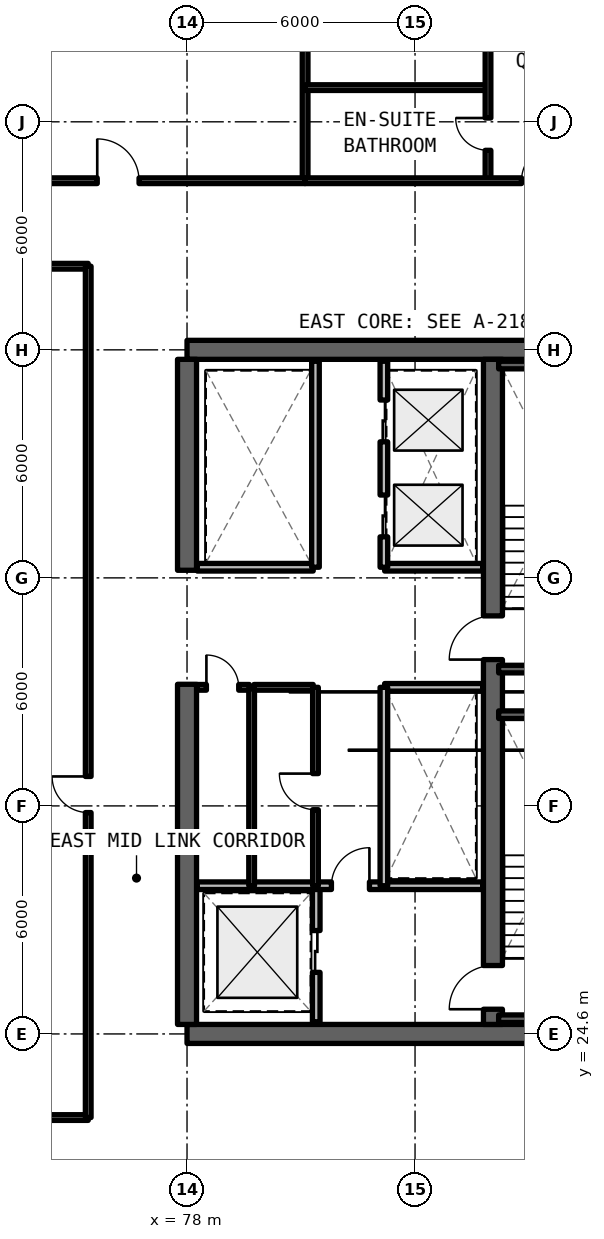
"""IFC4 building model, lengths in metres.
Left out: names, types, materials, properties, quantities, classifications, styles, units other than length and angle.
Written with IfcOpenShell. Run it as: python <this file> out.ifc"""

import sys

from ifc_helpers import new_model, si_unit, direction, frame, frame_2d, origin, place, context, subcontext, project, spatial, rectangle, extrude, element, fill, save


model = new_model("IFC4")
c1 = context("Model", 3, precision=1e-05, world=origin(), true_north=direction((0.0, 1.0)))
c2 = subcontext(c1, "Body", "Model", "MODEL_VIEW")
j1 = project(units=[si_unit("LENGTHUNIT", "METRE"), si_unit("PLANEANGLEUNIT", "RADIAN")], contexts=[c1])
p1 = place(None, origin())
s1 = spatial("IfcSite", under=j1, at=p1, CompositionType="ELEMENT")
p2 = place(p1, origin())
s2 = spatial("IfcBuilding", under=s1, at=p2, CompositionType="ELEMENT")
p3 = place(p2, frame((0.0, 0.0, 82.17)))
s3 = spatial("IfcBuildingStorey", under=s2, at=p3, CompositionType="ELEMENT", Elevation=82.17)
for number, where, z_axis, x_axis in (
    (1, (78.0, 24.6, 0.0), (0.0, 0.0, 1.0), (1.0, 0.0, 0.0)),
    (2, (90.0, 42.6, 0.0), (0.0, 0.0, 1.0), (-1.0, 0.0, 0.0)),
):
    element("IfcWall", number, at=place(p3, frame(where, z_axis=z_axis, x_axis=x_axis)), inside=s3, PredefinedType="SHEAR", context=c2, shape_type="SweptSolid", body=[
        extrude(rectangle(XDim=12.0, YDim=0.5, at=frame_2d((6.0, 0.0))), origin(), (0.0, 0.0, 1.0), 3.3),
    ])
p4 = place(p3, frame((78.0, 24.85, 0.0), z_axis=(0.0, 0.0, 1.0), x_axis=(0.0, 1.0, 0.0)))
e3 = element("IfcWall", 3, at=p4, inside=s3, PredefinedType="SHEAR", context=c2, shape_type="SweptSolid", body=[
    extrude(rectangle(XDim=8.95, YDim=0.5, at=frame_2d((4.475, 0.0))), origin(), (0.0, 0.0, 1.0), 3.3),
])
p5 = place(p3, frame((78.0, 36.8, 0.0), z_axis=(0.0, 0.0, 1.0), x_axis=(0.0, 1.0, 0.0)))
e4 = element("IfcWall", 4, at=p5, inside=s3, PredefinedType="SHEAR", context=c2, shape_type="SweptSolid", body=[
    extrude(rectangle(XDim=5.55, YDim=0.5, at=frame_2d((2.775, 0.0))), origin(), (0.0, 0.0, 1.0), 3.3),
])
p6 = place(p3, frame((86.05, 24.85, 0.0), z_axis=(0.0, 0.0, 1.0), x_axis=(0.0, 1.0, 0.0)))
e5 = element("IfcWall", 5, at=p6, inside=s3, PredefinedType="SHEAR", context=c2, shape_type="SweptSolid", body=[
    extrude(rectangle(XDim=17.5, YDim=0.5, at=frame_2d((8.75, 0.0))), origin(), (0.0, 0.0, 1.0), 3.3),
])
p7 = place(p6, frame((0.4, 0.0, 0.0)))
e6 = element("IfcOpeningElement", 6, at=p7, cuts=e5, PredefinedType="OPENING", context=c2, shape_type="SweptSolid", body=[
    extrude(rectangle(XDim=1.15, YDim=2.15, at=frame_2d((0.575, 1.075))), frame((0.0, 0.26, 0.0), z_axis=(0.0, -1.0, 0.0), x_axis=(1.0, 0.0, 0.0)), (0.0, 0.0, 1.0), 0.52),
])
p8 = place(p6, frame((9.6, 0.0, 0.0)))
e7 = element("IfcOpeningElement", 7, at=p8, cuts=e5, PredefinedType="OPENING", context=c2, shape_type="SweptSolid", body=[
    extrude(rectangle(XDim=1.15, YDim=2.15, at=frame_2d((0.575, 1.075))), frame((0.0, 0.26, 0.0), z_axis=(0.0, -1.0, 0.0), x_axis=(1.0, 0.0, 0.0)), (0.0, 0.0, 1.0), 0.52),
])
p9 = place(p3, frame((81.4, 24.92, 0.0), z_axis=(0.0, 0.0, 1.0), x_axis=(0.0, 1.0, 0.0)))
e8 = element("IfcWall", 8, at=p9, inside=s3, PredefinedType="SOLIDWALL", context=c2, shape_type="SweptSolid", body=[
    extrude(rectangle(XDim=3.58, YDim=0.2, at=frame_2d((1.79, 0.0))), origin(), (0.0, 0.0, 1.0), 2.35),
])
p10 = place(p9, frame((1.3, 0.0, 0.0)))
e9 = element("IfcOpeningElement", 9, at=p10, cuts=e8, PredefinedType="OPENING", context=c2, shape_type="SweptSolid", body=[
    extrude(rectangle(XDim=1.1, YDim=2.2, at=frame_2d((0.55, 1.1))), frame((0.0, 0.11, 0.0), z_axis=(0.0, -1.0, 0.0), x_axis=(1.0, 0.0, 0.0)), (0.0, 0.0, 1.0), 0.22),
])
p11 = place(p3, frame((78.27, 28.5, 0.0), z_axis=(0.0, 0.0, 1.0), x_axis=(1.0, 0.0, 0.0)))
e10 = element("IfcWall", 10, at=p11, inside=s3, PredefinedType="SOLIDWALL", context=c2, shape_type="SweptSolid", body=[
    extrude(rectangle(XDim=7.51, YDim=0.2, at=frame_2d((3.755, 0.0))), origin(), (0.0, 0.0, 1.0), 2.35),
])
p12 = place(p11, frame((3.53, 0.0, 0.0)))
e11 = element("IfcOpeningElement", 11, at=p12, cuts=e10, PredefinedType="OPENING", context=c2, shape_type="SweptSolid", body=[
    extrude(rectangle(XDim=1.0, YDim=2.15, at=frame_2d((0.5, 1.075))), frame((0.0, 0.11, 0.0), z_axis=(0.0, -1.0, 0.0), x_axis=(1.0, 0.0, 0.0)), (0.0, 0.0, 1.0), 0.22),
])
p13 = place(p3, frame((83.2, 33.72, 0.0), z_axis=(0.0, 0.0, 1.0), x_axis=(1.0, 0.0, 0.0)))
e12 = element("IfcWall", 12, at=p13, inside=s3, PredefinedType="SOLIDWALL", context=c2, shape_type="SweptSolid", body=[
    extrude(rectangle(XDim=2.58, YDim=0.2, at=frame_2d((1.29, 0.0))), origin(), (0.0, 0.0, 1.0), 2.35),
])
p14 = place(p3, frame((83.18, 28.5, 0.0), z_axis=(0.0, 0.0, 1.0), x_axis=(0.0, 1.0, 0.0)))
e13 = element("IfcWall", 13, at=p14, inside=s3, PredefinedType="SOLIDWALL", context=c2, shape_type="SweptSolid", body=[
    extrude(rectangle(XDim=5.22, YDim=0.2, at=frame_2d((2.61, 0.0))), origin(), (0.0, 0.0, 1.0), 2.35),
])
p15 = place(p3, frame((79.7, 28.5, 0.0), z_axis=(0.0, 0.0, 1.0), x_axis=(0.0, 1.0, 0.0)))
e14 = element("IfcWall", 14, at=p15, inside=s3, PredefinedType="SOLIDWALL", context=c2, shape_type="SweptSolid", body=[
    extrude(rectangle(XDim=5.22, YDim=0.15, at=frame_2d((2.61, 0.0))), origin(), (0.0, 0.0, 1.0), 2.35),
])
p16 = place(p3, frame((79.76, 33.72, 0.0), z_axis=(0.0, 0.0, 1.0), x_axis=(1.0, 0.0, 0.0)))
e15 = element("IfcWall", 15, at=p16, inside=s3, PredefinedType="SOLIDWALL", context=c2, shape_type="SweptSolid", body=[
    extrude(rectangle(XDim=1.56, YDim=0.15, at=frame_2d((0.78, 0.0))), origin(), (0.0, 0.0, 1.0), 2.35),
])
p17 = place(p3, frame((78.27, 33.72, 0.0), z_axis=(0.0, 0.0, 1.0), x_axis=(1.0, 0.0, 0.0)))
e16 = element("IfcWall", 16, at=p17, inside=s3, PredefinedType="SOLIDWALL", context=c2, shape_type="SweptSolid", body=[
    extrude(rectangle(XDim=1.37, YDim=0.15, at=frame_2d((0.685, 0.0))), origin(), (0.0, 0.0, 1.0), 2.35),
])
p18 = place(p17, frame((0.24, 0.0, 0.0)))
e17 = element("IfcOpeningElement", 17, at=p18, cuts=e16, PredefinedType="OPENING", context=c2, shape_type="SweptSolid", body=[
    extrude(rectangle(XDim=0.85, YDim=2.1, at=frame_2d((0.425, 1.05))), frame((0.0, 0.085, 0.0), z_axis=(0.0, -1.0, 0.0), x_axis=(1.0, 0.0, 0.0)), (0.0, 0.0, 1.0), 0.17),
])
p19 = place(p3, frame((81.38, 28.5, 0.0), z_axis=(0.0, 0.0, 1.0), x_axis=(0.0, 1.0, 0.0)))
e18 = element("IfcWall", 18, at=p19, inside=s3, PredefinedType="SOLIDWALL", context=c2, shape_type="SweptSolid", body=[
    extrude(rectangle(XDim=5.22, YDim=0.15, at=frame_2d((2.61, 0.0))), origin(), (0.0, 0.0, 1.0), 2.35),
])
p20 = place(p19, frame((2.0, 0.0, 0.0)))
e19 = element("IfcOpeningElement", 19, at=p20, cuts=e18, PredefinedType="OPENING", context=c2, shape_type="SweptSolid", body=[
    extrude(rectangle(XDim=0.95, YDim=2.15, at=frame_2d((0.475, 1.075))), frame((0.0, 0.085, 0.0), z_axis=(0.0, -1.0, 0.0), x_axis=(1.0, 0.0, 0.0)), (0.0, 0.0, 1.0), 0.17),
])
p21 = place(p3, frame((83.2, 36.88, 0.0), z_axis=(0.0, 0.0, 1.0), x_axis=(1.0, 0.0, 0.0)))
e20 = element("IfcWall", 20, at=p21, inside=s3, PredefinedType="SOLIDWALL", context=c2, shape_type="SweptSolid", body=[
    extrude(rectangle(XDim=2.58, YDim=0.2, at=frame_2d((1.29, 0.0))), origin(), (0.0, 0.0, 1.0), 2.35),
])
p22 = place(p3, frame((83.18, 36.88, 0.0), z_axis=(0.0, 0.0, 1.0), x_axis=(0.0, 1.0, 0.0)))
e21 = element("IfcWall", 21, at=p22, inside=s3, PredefinedType="SOLIDWALL", context=c2, shape_type="SweptSolid", body=[
    extrude(rectangle(XDim=5.42, YDim=0.2, at=frame_2d((2.71, 0.0))), origin(), (0.0, 0.0, 1.0), 2.35),
])
p23 = place(p22, frame((0.8, 0.0, 0.0)))
e22 = element("IfcOpeningElement", 22, at=p23, cuts=e21, PredefinedType="OPENING", context=c2, shape_type="SweptSolid", body=[
    extrude(rectangle(XDim=1.1, YDim=2.2, at=frame_2d((0.55, 1.1))), frame((0.0, 0.11, 0.0), z_axis=(0.0, -1.0, 0.0), x_axis=(1.0, 0.0, 0.0)), (0.0, 0.0, 1.0), 0.22),
])
p24 = place(p22, frame((3.3, 0.0, 0.0)))
e23 = element("IfcOpeningElement", 23, at=p24, cuts=e21, PredefinedType="OPENING", context=c2, shape_type="SweptSolid", body=[
    extrude(rectangle(XDim=1.1, YDim=2.2, at=frame_2d((0.55, 1.1))), frame((0.0, 0.11, 0.0), z_axis=(0.0, -1.0, 0.0), x_axis=(1.0, 0.0, 0.0)), (0.0, 0.0, 1.0), 0.22),
])
p25 = place(p3, frame((78.27, 36.88, 0.0), z_axis=(0.0, 0.0, 1.0), x_axis=(1.0, 0.0, 0.0)))
e24 = element("IfcWall", 24, at=p25, inside=s3, PredefinedType="SOLIDWALL", context=c2, shape_type="SweptSolid", body=[
    extrude(rectangle(XDim=3.05, YDim=0.2, at=frame_2d((1.525, 0.0))), origin(), (0.0, 0.0, 1.0), 2.35),
])
p26 = place(p3, frame((81.38, 36.88, 0.0), z_axis=(0.0, 0.0, 1.0), x_axis=(0.0, 1.0, 0.0)))
e25 = element("IfcWall", 25, at=p26, inside=s3, PredefinedType="SOLIDWALL", context=c2, shape_type="SweptSolid", body=[
    extrude(rectangle(XDim=5.42, YDim=0.2, at=frame_2d((2.71, 0.0))), origin(), (0.0, 0.0, 1.0), 2.35),
])
for number, where, z_axis, x_axis in (
    (26, (67.15, 22.4, 0.0), (0.0, 0.0, 1.0), (1.0, 0.0, 0.0)),
    (27, (67.15, 44.8, 0.0), (0.0, 0.0, 1.0), (1.0, 0.0, 0.0)),
):
    element("IfcWall", number, at=place(p3, frame(where, z_axis=z_axis, x_axis=x_axis)), inside=s3, PredefinedType="SOLIDWALL", context=c2, shape_type="SweptSolid", body=[
        extrude(rectangle(XDim=8.25, YDim=0.15, at=frame_2d((4.125, 0.0))), origin(), (0.0, 0.0, 1.0), 2.35),
    ])
p27 = place(p3, frame((75.4, 22.4, 0.0), z_axis=(0.0, 0.0, 1.0), x_axis=(0.0, 1.0, 0.0)))
e28 = element("IfcWall", 28, at=p27, inside=s3, PredefinedType="SOLIDWALL", context=c2, shape_type="SweptSolid", body=[
    extrude(rectangle(XDim=22.4, YDim=0.15, at=frame_2d((11.2, 0.0))), origin(), (0.0, 0.0, 1.0), 2.35),
])
p28 = place(p27, frame((8.025, 0.0, 0.0)))
e29 = element("IfcOpeningElement", 29, at=p28, cuts=e28, PredefinedType="OPENING", context=c2, shape_type="SweptSolid", body=[
    extrude(rectangle(XDim=0.95, YDim=2.15, at=frame_2d((0.475, 1.075))), frame((0.0, 0.085, 0.0), z_axis=(0.0, -1.0, 0.0), x_axis=(1.0, 0.0, 0.0)), (0.0, 0.0, 1.0), 0.17),
])
p29 = place(p3, frame((81.107, 47.05, 0.0), z_axis=(0.0, 0.0, 1.0), x_axis=(0.0, 1.0, 0.0)))
e30 = element("IfcWall", 30, at=p29, inside=s3, PredefinedType="SOLIDWALL", context=c2, shape_type="SweptSolid", body=[
    extrude(rectangle(XDim=10.3, YDim=0.15, at=frame_2d((5.15, 0.0))), origin(), (0.0, 0.0, 1.0), 2.35),
])
p30 = place(p3, frame((71.268, 47.05, 0.0), z_axis=(0.0, 0.0, 1.0), x_axis=(1.0, 0.0, 0.0)))
e31 = element("IfcWall", 31, at=p30, inside=s3, PredefinedType="SOLIDWALL", context=c2, shape_type="SweptSolid", body=[
    extrude(rectangle(XDim=9.84, YDim=0.15, at=frame_2d((4.92, 0.0))), origin(), (0.0, 0.0, 1.0), 2.35),
])
p31 = place(p30, frame((4.37, 0.0, 0.0)))
e32 = element("IfcOpeningElement", 32, at=p31, cuts=e31, PredefinedType="OPENING", context=c2, shape_type="SweptSolid", body=[
    extrude(rectangle(XDim=1.1, YDim=2.15, at=frame_2d((0.55, 1.075))), frame((0.0, 0.085, 0.0), z_axis=(0.0, -1.0, 0.0), x_axis=(1.0, 0.0, 0.0)), (0.0, 0.0, 1.0), 0.17),
])
p32 = place(p3, frame((81.107, 49.5, 0.0), z_axis=(0.0, 0.0, 1.0), x_axis=(1.0, 0.0, 0.0)))
e33 = element("IfcWall", 33, at=p32, inside=s3, PredefinedType="PARTITIONING", context=c2, shape_type="SweptSolid", body=[
    extrude(rectangle(XDim=4.812, YDim=0.15, at=frame_2d((2.406, 0.0))), origin(), (0.0, 0.0, 1.0), 2.35),
])
p33 = place(p3, frame((85.92, 47.05, 0.0), z_axis=(0.0, 0.0, 1.0), x_axis=(0.0, 1.0, 0.0)))
e34 = element("IfcWall", 34, at=p33, inside=s3, PredefinedType="PARTITIONING", context=c2, shape_type="SweptSolid", body=[
    extrude(rectangle(XDim=10.3, YDim=0.15, at=frame_2d((5.15, 0.0))), origin(), (0.0, 0.0, 1.0), 2.35),
])
p34 = place(p33, frame((0.8, 0.0, 0.0)))
e35 = element("IfcOpeningElement", 35, at=p34, cuts=e34, PredefinedType="OPENING", context=c2, shape_type="SweptSolid", body=[
    extrude(rectangle(XDim=0.85, YDim=2.1, at=frame_2d((0.425, 1.05))), frame((0.0, 0.085, 0.0), z_axis=(0.0, -1.0, 0.0), x_axis=(1.0, 0.0, 0.0)), (0.0, 0.0, 1.0), 0.17),
])
p35 = place(p33, frame((5.25, 0.0, 0.0)))
e36 = element("IfcOpeningElement", 36, at=p35, cuts=e34, PredefinedType="OPENING", context=c2, shape_type="SweptSolid", body=[
    extrude(rectangle(XDim=0.85, YDim=2.1, at=frame_2d((0.425, 1.05))), frame((0.0, 0.085, 0.0), z_axis=(0.0, -1.0, 0.0), x_axis=(1.0, 0.0, 0.0)), (0.0, 0.0, 1.0), 0.17),
])
p36 = place(p3, frame((81.107, 47.05, 0.0), z_axis=(0.0, 0.0, 1.0), x_axis=(1.0, 0.0, 0.0)))
e37 = element("IfcWall", 37, at=p36, inside=s3, PredefinedType="SOLIDWALL", context=c2, shape_type="SweptSolid", body=[
    extrude(rectangle(XDim=7.446, YDim=0.15, at=frame_2d((3.723, 0.0))), origin(), (0.0, 0.0, 1.0), 2.35),
])
p37 = place(p36, frame((5.694, 0.0, 0.0)))
e38 = element("IfcOpeningElement", 38, at=p37, cuts=e37, PredefinedType="OPENING", context=c2, shape_type="SweptSolid", body=[
    extrude(rectangle(XDim=0.95, YDim=2.15, at=frame_2d((0.475, 1.075))), frame((0.0, 0.085, 0.0), z_axis=(0.0, -1.0, 0.0), x_axis=(1.0, 0.0, 0.0)), (0.0, 0.0, 1.0), 0.17),
])
for number, where, z_axis, x_axis in (
    (39, (86.2, 25.0, 0.0), (0.0, 0.0, 1.0), (1.0, 0.0, 0.0)),
    (40, (89.6, 33.0, 0.0), (0.0, 0.0, 1.0), (-1.0, 0.0, 0.0)),
    (41, (86.2, 34.2, 0.0), (0.0, 0.0, 1.0), (1.0, 0.0, 0.0)),
    (42, (89.6, 42.2, 0.0), (0.0, 0.0, 1.0), (-1.0, 0.0, 0.0)),
):
    element("IfcWall", number, at=place(p3, frame(where, z_axis=z_axis, x_axis=x_axis)), inside=s3, PredefinedType="SOLIDWALL", context=c2, shape_type="SweptSolid", body=[
        extrude(rectangle(XDim=3.4, YDim=0.2, at=frame_2d((1.7, 0.0))), origin(), (0.0, 0.0, 1.0), 3.3),
    ])
p38 = place(p10, origin())
e43 = element("IfcDoor", 43, at=p38, inside=s3, OperationType="SLIDING_TO_LEFT", PredefinedType="DOOR", context=c2, shape_type="SweptSolid", body=[
    extrude(rectangle(XDim=1.1, YDim=2.2, at=frame_2d((0.55, 1.1))), frame((0.0, 0.025, 0.0), z_axis=(0.0, -1.0, 0.0), x_axis=(1.0, 0.0, 0.0)), (0.0, 0.0, 1.0), 0.05),
])
fill(e9, e43)
p39 = place(p12, origin())
e44 = element("IfcDoor", 44, at=p39, inside=s3, OperationType="SINGLE_SWING_RIGHT", PredefinedType="DOOR", context=c2, shape_type="SweptSolid", body=[
    extrude(rectangle(XDim=1.0, YDim=2.15, at=frame_2d((0.5, 1.075))), frame((0.0, 0.025, 0.0), z_axis=(0.0, -1.0, 0.0), x_axis=(1.0, 0.0, 0.0)), (0.0, 0.0, 1.0), 0.05),
])
fill(e11, e44)
p40 = place(p18, origin())
e45 = element("IfcDoor", 45, at=p40, inside=s3, OperationType="SINGLE_SWING_LEFT", PredefinedType="DOOR", context=c2, shape_type="SweptSolid", body=[
    extrude(rectangle(XDim=0.85, YDim=2.1, at=frame_2d((0.425, 1.05))), frame((0.0, 0.025, 0.0), z_axis=(0.0, -1.0, 0.0), x_axis=(1.0, 0.0, 0.0)), (0.0, 0.0, 1.0), 0.05),
])
fill(e17, e45)
p41 = place(p20, origin())
e46 = element("IfcDoor", 46, at=p41, inside=s3, OperationType="SINGLE_SWING_RIGHT", PredefinedType="DOOR", context=c2, shape_type="SweptSolid", body=[
    extrude(rectangle(XDim=0.95, YDim=2.15, at=frame_2d((0.475, 1.075))), frame((0.0, 0.025, 0.0), z_axis=(0.0, -1.0, 0.0), x_axis=(1.0, 0.0, 0.0)), (0.0, 0.0, 1.0), 0.05),
])
fill(e19, e46)
p42 = place(p23, origin())
e47 = element("IfcDoor", 47, at=p42, inside=s3, OperationType="SLIDING_TO_LEFT", PredefinedType="DOOR", context=c2, shape_type="SweptSolid", body=[
    extrude(rectangle(XDim=1.1, YDim=2.2, at=frame_2d((0.55, 1.1))), frame((0.0, 0.025, 0.0), z_axis=(0.0, -1.0, 0.0), x_axis=(1.0, 0.0, 0.0)), (0.0, 0.0, 1.0), 0.05),
])
fill(e22, e47)
p43 = place(p24, origin())
e48 = element("IfcDoor", 48, at=p43, inside=s3, OperationType="SLIDING_TO_RIGHT", PredefinedType="DOOR", context=c2, shape_type="SweptSolid", body=[
    extrude(rectangle(XDim=1.1, YDim=2.2, at=frame_2d((0.55, 1.1))), frame((0.0, 0.025, 0.0), z_axis=(0.0, -1.0, 0.0), x_axis=(1.0, 0.0, 0.0)), (0.0, 0.0, 1.0), 0.05),
])
fill(e23, e48)
p44 = place(p28, origin())
e49 = element("IfcDoor", 49, at=p44, inside=s3, OperationType="SINGLE_SWING_RIGHT", PredefinedType="DOOR", context=c2, shape_type="SweptSolid", body=[
    extrude(rectangle(XDim=0.95, YDim=2.15, at=frame_2d((0.475, 1.075))), frame((0.0, 0.025, 0.0), z_axis=(0.0, -1.0, 0.0), x_axis=(1.0, 0.0, 0.0)), (0.0, 0.0, 1.0), 0.05),
])
fill(e29, e49)
p45 = place(p31, origin())
e50 = element("IfcDoor", 50, at=p45, inside=s3, OperationType="SINGLE_SWING_LEFT", PredefinedType="DOOR", context=c2, shape_type="SweptSolid", body=[
    extrude(rectangle(XDim=1.1, YDim=2.15, at=frame_2d((0.55, 1.075))), frame((0.0, 0.025, 0.0), z_axis=(0.0, -1.0, 0.0), x_axis=(1.0, 0.0, 0.0)), (0.0, 0.0, 1.0), 0.05),
])
fill(e32, e50)
p46 = place(p34, origin())
e51 = element("IfcDoor", 51, at=p46, inside=s3, OperationType="SINGLE_SWING_RIGHT", PredefinedType="DOOR", context=c2, shape_type="SweptSolid", body=[
    extrude(rectangle(XDim=0.85, YDim=2.1, at=frame_2d((0.425, 1.05))), frame((0.0, 0.025, 0.0), z_axis=(0.0, -1.0, 0.0), x_axis=(1.0, 0.0, 0.0)), (0.0, 0.0, 1.0), 0.05),
])
fill(e35, e51)
p47 = place(p37, origin())
e52 = element("IfcDoor", 52, at=p47, inside=s3, OperationType="SINGLE_SWING_RIGHT", PredefinedType="DOOR", context=c2, shape_type="SweptSolid", body=[
    extrude(rectangle(XDim=0.95, YDim=2.15, at=frame_2d((0.475, 1.075))), frame((0.0, 0.025, 0.0), z_axis=(0.0, -1.0, 0.0), x_axis=(1.0, 0.0, 0.0)), (0.0, 0.0, 1.0), 0.05),
])
fill(e38, e52)
p48 = place(p7, origin())
e53 = element("IfcDoor", 53, at=p48, inside=s3, OperationType="SINGLE_SWING_LEFT", PredefinedType="DOOR", context=c2, shape_type="SweptSolid", body=[
    extrude(rectangle(XDim=1.15, YDim=2.15, at=frame_2d((0.575, 1.075))), frame((0.0, 0.025, 0.0), z_axis=(0.0, -1.0, 0.0), x_axis=(1.0, 0.0, 0.0)), (0.0, 0.0, 1.0), 0.05),
])
fill(e6, e53)
p49 = place(p8, origin())
e54 = element("IfcDoor", 54, at=p49, inside=s3, OperationType="SINGLE_SWING_RIGHT", PredefinedType="DOOR", context=c2, shape_type="SweptSolid", body=[
    extrude(rectangle(XDim=1.15, YDim=2.15, at=frame_2d((0.575, 1.075))), frame((0.0, 0.025, 0.0), z_axis=(0.0, -1.0, 0.0), x_axis=(1.0, 0.0, 0.0)), (0.0, 0.0, 1.0), 0.05),
])
fill(e7, e54)
save(model, sys.argv[1])
